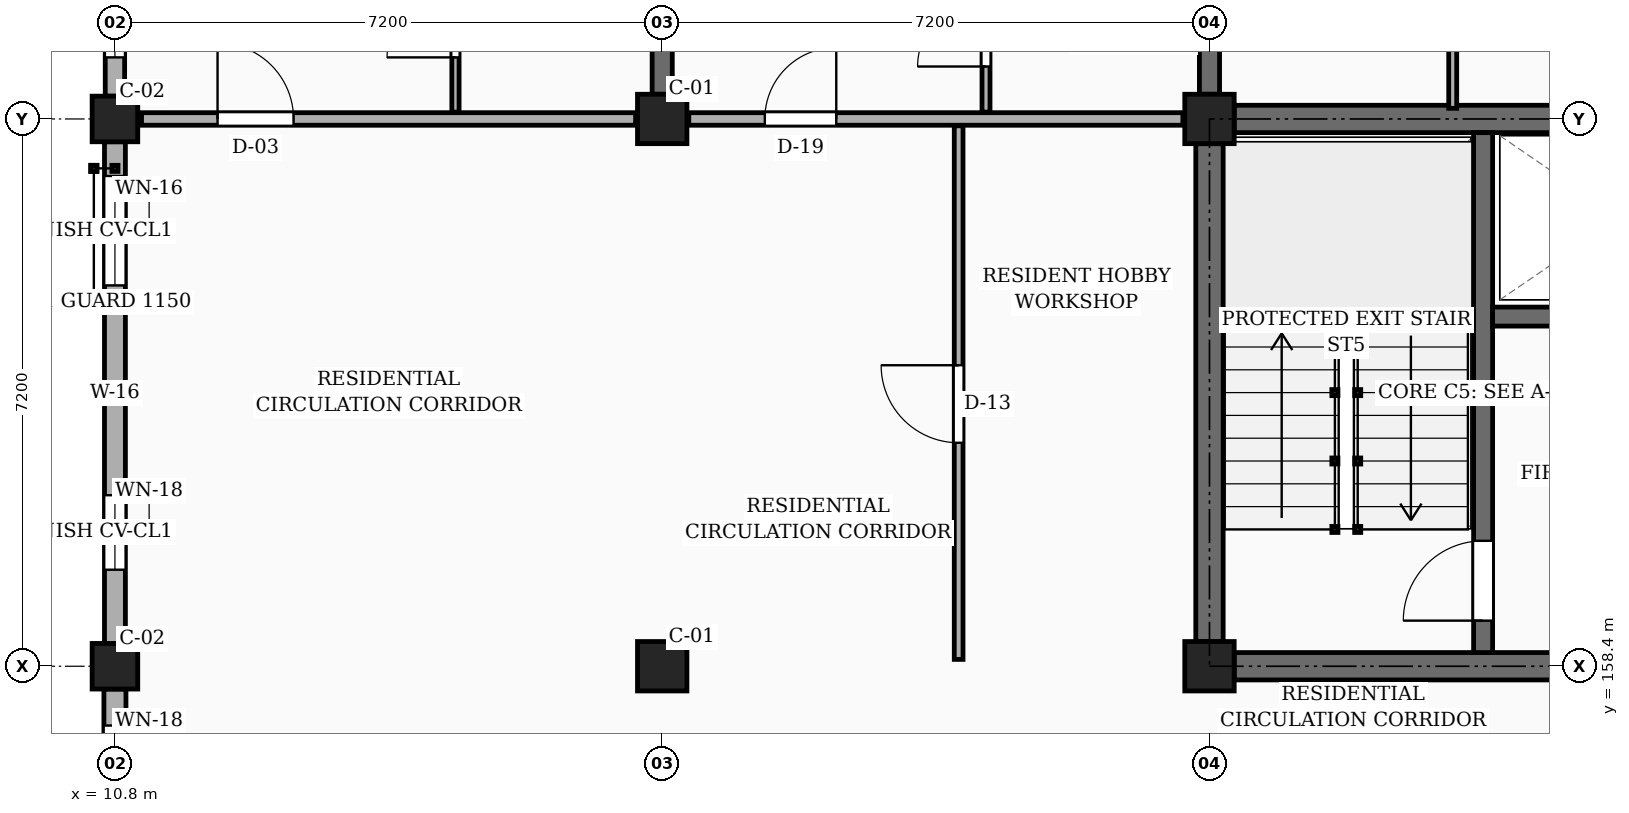
"""IFC4 building model, lengths in metres.
Left out: names, types, materials, properties, quantities, classifications, styles, units other than length and angle.
Written with IfcOpenShell. Run it as: python <this file> out.ifc"""

import sys

from ifc_helpers import new_model, si_unit, direction, frame, frame_2d, origin, origin_2d, place, context, subcontext, project, spatial, rectangle, extrude, element, fill, save


model = new_model("IFC4")
c1 = context("Model", 3, precision=1e-05, world=origin(), true_north=direction((0.0, 1.0)))
c2 = subcontext(c1, "Body", "Model", "MODEL_VIEW")
j1 = project(units=[si_unit("LENGTHUNIT", "METRE"), si_unit("PLANEANGLEUNIT", "RADIAN")], contexts=[c1])
p1 = place(None, origin())
s1 = spatial("IfcSite", under=j1, at=p1, CompositionType="ELEMENT")
p2 = place(p1, origin())
s2 = spatial("IfcBuilding", under=s1, at=p2, CompositionType="ELEMENT")
p3 = place(p2, frame((0.0, 0.0, 7.65)))
s3 = spatial("IfcBuildingStorey", under=s2, at=p3, CompositionType="ELEMENT", Elevation=7.65)
for number, where, z_axis, x_axis in (
    (1, (10.8, 158.4, 0.0), (0.0, 0.0, 1.0), (1.0, 0.0, 0.0)),
    (2, (10.8, 165.6, 0.0), (0.0, 0.0, 1.0), (1.0, 0.0, 0.0)),
):
    element("IfcColumn", number, at=place(p3, frame(where, z_axis=z_axis, x_axis=x_axis)), inside=s3, PredefinedType="COLUMN", context=c2, shape_type="SweptSolid", body=[
        extrude(rectangle(XDim=0.6, YDim=0.6, at=origin_2d()), origin(), (0.0, 0.0, 1.0), 3.15),
    ])
for number, where, z_axis, x_axis in (
    (3, (18.0, 158.4, 0.0), (0.0, 0.0, 1.0), (1.0, 0.0, 0.0)),
    (4, (18.0, 165.6, 0.0), (0.0, 0.0, 1.0), (1.0, 0.0, 0.0)),
    (5, (25.2, 158.4, 0.0), (0.0, 0.0, 1.0), (1.0, 0.0, 0.0)),
    (6, (25.2, 165.6, 0.0), (0.0, 0.0, 1.0), (1.0, 0.0, 0.0)),
):
    element("IfcColumn", number, at=place(p3, frame(where, z_axis=z_axis, x_axis=x_axis)), inside=s3, PredefinedType="COLUMN", context=c2, shape_type="SweptSolid", body=[
        extrude(rectangle(XDim=0.65, YDim=0.65, at=origin_2d()), origin(), (0.0, 0.0, 1.0), 3.15),
    ])
p4 = place(p3, frame((18.0, 165.925, 0.0), z_axis=(0.0, 0.0, 1.0), x_axis=(0.0, 1.0, 0.0)))
e7 = element("IfcWall", 7, at=p4, inside=s3, PredefinedType="SOLIDWALL", context=c2, shape_type="SweptSolid", body=[
    extrude(rectangle(XDim=6.575, YDim=0.265, at=frame_2d((3.288, 0.0))), origin(), (0.0, 0.0, 1.0), 2.185),
])
p5 = place(p3, frame((25.2, 165.925, 0.0), z_axis=(0.0, 0.0, 1.0), x_axis=(0.0, 1.0, 0.0)))
e8 = element("IfcWall", 8, at=p5, inside=s3, PredefinedType="SOLIDWALL", context=c2, shape_type="SweptSolid", body=[
    extrude(rectangle(XDim=6.575, YDim=0.265, at=frame_2d((3.288, 0.0))), origin(), (0.0, 0.0, 1.0), 2.185),
])
p6 = place(p5, frame((4.15, 0.0, 0.0)))
e9 = element("IfcOpeningElement", 9, at=p6, cuts=e8, PredefinedType="OPENING", context=c2, shape_type="SweptSolid", body=[
    extrude(rectangle(XDim=0.98, YDim=2.12, at=frame_2d((0.49, 1.06))), frame((0.0, 0.143, 0.0), z_axis=(0.0, -1.0, 0.0), x_axis=(1.0, 0.0, 0.0)), (0.0, 0.0, 1.0), 0.285),
])
p7 = place(p3, frame((10.8, 172.5, 0.0), z_axis=(0.0, 0.0, 1.0), x_axis=(0.0, -1.0, 0.0)))
e10 = element("IfcWall", 10, at=p7, inside=s3, PredefinedType="SOLIDWALL", context=c2, shape_type="SweptSolid", body=[
    extrude(rectangle(XDim=6.6, YDim=0.255, at=frame_2d((3.3, 0.0))), origin(), (0.0, 0.0, 1.0), 2.455),
])
p8 = place(p7, frame((0.45, 0.0, 0.78)))
e11 = element("IfcOpeningElement", 11, at=p8, cuts=e10, PredefinedType="OPENING", context=c2, shape_type="SweptSolid", body=[
    extrude(rectangle(XDim=1.28, YDim=1.26, at=frame_2d((0.64, 0.63))), frame((0.0, 0.137, 0.0), z_axis=(0.0, -1.0, 0.0), x_axis=(1.0, 0.0, 0.0)), (0.0, 0.0, 1.0), 0.275),
])
p9 = place(p7, frame((4.65, 0.0, 0.78)))
e12 = element("IfcOpeningElement", 12, at=p9, cuts=e10, PredefinedType="OPENING", context=c2, shape_type="SweptSolid", body=[
    extrude(rectangle(XDim=1.44, YDim=1.26, at=frame_2d((0.72, 0.63))), frame((0.0, 0.137, 0.0), z_axis=(0.0, -1.0, 0.0), x_axis=(1.0, 0.0, 0.0)), (0.0, 0.0, 1.0), 0.275),
])
p10 = place(p3, frame((10.8, 165.3, 0.0), z_axis=(0.0, 0.0, 1.0), x_axis=(0.0, -1.0, 0.0)))
e13 = element("IfcWall", 13, at=p10, inside=s3, PredefinedType="SOLIDWALL", context=c2, shape_type="SweptSolid", body=[
    extrude(rectangle(XDim=6.6, YDim=0.275, at=frame_2d((3.3, 0.0))), origin(), (0.0, 0.0, 1.0), 2.455),
])
p11 = place(p10, frame((0.45, 0.0, 0.78)))
e14 = element("IfcOpeningElement", 14, at=p11, cuts=e13, PredefinedType="OPENING", context=c2, shape_type="SweptSolid", body=[
    extrude(rectangle(XDim=1.44, YDim=1.26, at=frame_2d((0.72, 0.63))), frame((0.0, 0.147, 0.0), z_axis=(0.0, -1.0, 0.0), x_axis=(1.0, 0.0, 0.0)), (0.0, 0.0, 1.0), 0.295),
])
p12 = place(p10, frame((4.65, 0.0, 0.78)))
e15 = element("IfcOpeningElement", 15, at=p12, cuts=e13, PredefinedType="OPENING", context=c2, shape_type="SweptSolid", body=[
    extrude(rectangle(XDim=0.98, YDim=1.36, at=frame_2d((0.49, 0.68))), frame((0.0, 0.147, 0.0), z_axis=(0.0, -1.0, 0.0), x_axis=(1.0, 0.0, 0.0)), (0.0, 0.0, 1.0), 0.295),
])
p13 = place(p3, frame((10.8, 158.1, 0.0), z_axis=(0.0, 0.0, 1.0), x_axis=(0.0, -1.0, 0.0)))
e16 = element("IfcWall", 16, at=p13, inside=s3, PredefinedType="SOLIDWALL", context=c2, shape_type="SweptSolid", body=[
    extrude(rectangle(XDim=6.6, YDim=0.29, at=frame_2d((3.3, 0.0))), origin(), (0.0, 0.0, 1.0), 2.455),
])
p14 = place(p13, frame((0.48, 0.0, 0.78)))
e17 = element("IfcOpeningElement", 17, at=p14, cuts=e16, PredefinedType="OPENING", context=c2, shape_type="SweptSolid", body=[
    extrude(rectangle(XDim=0.98, YDim=1.36, at=frame_2d((0.49, 0.68))), frame((0.0, 0.155, 0.0), z_axis=(0.0, -1.0, 0.0), x_axis=(1.0, 0.0, 0.0)), (0.0, 0.0, 1.0), 0.31),
])
p15 = place(p13, frame((2.705, 0.0, 0.78)))
e18 = element("IfcOpeningElement", 18, at=p15, cuts=e16, PredefinedType="OPENING", context=c2, shape_type="SweptSolid", body=[
    extrude(rectangle(XDim=1.14, YDim=1.36, at=frame_2d((0.57, 0.68))), frame((0.0, 0.155, 0.0), z_axis=(0.0, -1.0, 0.0), x_axis=(1.0, 0.0, 0.0)), (0.0, 0.0, 1.0), 0.31),
])
p16 = place(p13, frame((5.085, 0.0, 0.78)))
e19 = element("IfcOpeningElement", 19, at=p16, cuts=e16, PredefinedType="OPENING", context=c2, shape_type="SweptSolid", body=[
    extrude(rectangle(XDim=1.04, YDim=1.26, at=frame_2d((0.52, 0.63))), frame((0.0, 0.155, 0.0), z_axis=(0.0, -1.0, 0.0), x_axis=(1.0, 0.0, 0.0)), (0.0, 0.0, 1.0), 0.31),
])
p17 = place(p3, frame((25.2, 158.725, 0.0), z_axis=(0.0, 0.0, 1.0), x_axis=(0.0, 1.0, 0.0)))
e20 = element("IfcWall", 20, at=p17, inside=s3, PredefinedType="SHEAR", context=c2, shape_type="SweptSolid", body=[
    extrude(rectangle(XDim=6.55, YDim=0.36, at=frame_2d((3.275, 0.0))), origin(), (0.0, 0.0, 1.0), 2.885),
])
p18 = place(p3, frame((25.525, 165.6, 0.0), z_axis=(0.0, 0.0, 1.0), x_axis=(1.0, 0.0, 0.0)))
e21 = element("IfcWall", 21, at=p18, inside=s3, PredefinedType="SHEAR", context=c2, shape_type="SweptSolid", body=[
    extrude(rectangle(XDim=6.55, YDim=0.36, at=frame_2d((3.275, 0.0))), origin(), (0.0, 0.0, 1.0), 2.885),
])
p19 = place(p3, frame((25.525, 158.4, 0.0), z_axis=(0.0, 0.0, 1.0), x_axis=(1.0, 0.0, 0.0)))
e22 = element("IfcWall", 22, at=p19, inside=s3, PredefinedType="SHEAR", context=c2, shape_type="SweptSolid", body=[
    extrude(rectangle(XDim=6.55, YDim=0.36, at=frame_2d((3.275, 0.0))), origin(), (0.0, 0.0, 1.0), 2.885),
])
p20 = place(p19, frame((4.425, 0.0, 0.0)))
e23 = element("IfcOpeningElement", 23, at=p20, cuts=e22, PredefinedType="OPENING", context=c2, shape_type="SweptSolid", body=[
    extrude(rectangle(XDim=1.1, YDim=2.15, at=frame_2d((0.55, 1.075))), frame((0.0, 0.19, 0.0), z_axis=(0.0, -1.0, 0.0), x_axis=(1.0, 0.0, 0.0)), (0.0, 0.0, 1.0), 0.38),
])
p21 = place(p3, frame((28.8, 158.58, 0.0), z_axis=(0.0, 0.0, 1.0), x_axis=(0.0, 1.0, 0.0)))
e24 = element("IfcWall", 24, at=p21, inside=s3, PredefinedType="SHEAR", context=c2, shape_type="SweptSolid", body=[
    extrude(rectangle(XDim=6.84, YDim=0.25, at=frame_2d((3.42, 0.0))), origin(), (0.0, 0.0, 1.0), 2.885),
])
p22 = place(p21, frame((0.42, 0.0, 0.0)))
e25 = element("IfcOpeningElement", 25, at=p22, cuts=e24, PredefinedType="OPENING", context=c2, shape_type="SweptSolid", body=[
    extrude(rectangle(XDim=1.05, YDim=2.15, at=frame_2d((0.525, 1.075))), frame((0.0, 0.135, 0.0), z_axis=(0.0, -1.0, 0.0), x_axis=(1.0, 0.0, 0.0)), (0.0, 0.0, 1.0), 0.27),
])
p23 = place(p3, frame((28.925, 163.0, 0.0), z_axis=(0.0, 0.0, 1.0), x_axis=(1.0, 0.0, 0.0)))
e26 = element("IfcWall", 26, at=p23, inside=s3, PredefinedType="SHEAR", context=c2, shape_type="SweptSolid", body=[
    extrude(rectangle(XDim=3.295, YDim=0.25, at=frame_2d((1.647, 0.0))), origin(), (0.0, 0.0, 1.0), 2.885),
])
p24 = place(p23, frame((1.1, 0.0, 0.0)))
e27 = element("IfcOpeningElement", 27, at=p24, cuts=e26, PredefinedType="OPENING", context=c2, shape_type="SweptSolid", body=[
    extrude(rectangle(XDim=1.1, YDim=2.2, at=frame_2d((0.55, 1.1))), frame((0.0, 0.135, 0.0), z_axis=(0.0, -1.0, 0.0), x_axis=(1.0, 0.0, 0.0)), (0.0, 0.0, 1.0), 0.27),
])
p25 = place(p3, frame((11.15, 165.6, 0.0), z_axis=(0.0, 0.0, 1.0), x_axis=(1.0, 0.0, 0.0)))
e28 = element("IfcWall", 28, at=p25, inside=s3, PredefinedType="PARTITIONING", context=c2, shape_type="SweptSolid", body=[
    extrude(rectangle(XDim=6.5, YDim=0.165, at=frame_2d((3.25, 0.0))), origin(), (0.0, 0.0, 1.0), 2.185),
])
p26 = place(p25, frame((1.0, 0.0, 0.0)))
e29 = element("IfcOpeningElement", 29, at=p26, cuts=e28, PredefinedType="OPENING", context=c2, shape_type="SweptSolid", body=[
    extrude(rectangle(XDim=1.0, YDim=2.15, at=frame_2d((0.5, 1.075))), frame((0.0, 0.093, 0.0), z_axis=(0.0, -1.0, 0.0), x_axis=(1.0, 0.0, 0.0)), (0.0, 0.0, 1.0), 0.185),
])
p27 = place(p3, frame((18.35, 165.6, 0.0), z_axis=(0.0, 0.0, 1.0), x_axis=(1.0, 0.0, 0.0)))
e30 = element("IfcWall", 30, at=p27, inside=s3, PredefinedType="PARTITIONING", context=c2, shape_type="SweptSolid", body=[
    extrude(rectangle(XDim=6.5, YDim=0.165, at=frame_2d((3.25, 0.0))), origin(), (0.0, 0.0, 1.0), 2.185),
])
p28 = place(p27, frame((1.0, 0.0, 0.0)))
e31 = element("IfcOpeningElement", 31, at=p28, cuts=e30, PredefinedType="OPENING", context=c2, shape_type="SweptSolid", body=[
    extrude(rectangle(XDim=0.94, YDim=2.12, at=frame_2d((0.47, 1.06))), frame((0.0, 0.093, 0.0), z_axis=(0.0, -1.0, 0.0), x_axis=(1.0, 0.0, 0.0)), (0.0, 0.0, 1.0), 0.185),
])
p29 = place(p3, frame((15.28, 165.69, 0.0), z_axis=(0.0, 0.0, 1.0), x_axis=(0.0, 1.0, 0.0)))
e32 = element("IfcWall", 32, at=p29, inside=s3, PredefinedType="PARTITIONING", context=c2, shape_type="SweptSolid", body=[
    extrude(rectangle(XDim=2.34, YDim=0.095, at=frame_2d((1.17, 0.0))), origin(), (0.0, 0.0, 1.0), 2.32),
])
p30 = place(p29, frame((0.72, 0.0, 0.0)))
e33 = element("IfcOpeningElement", 33, at=p30, cuts=e32, PredefinedType="OPENING", context=c2, shape_type="SweptSolid", body=[
    extrude(rectangle(XDim=0.9, YDim=2.05, at=frame_2d((0.45, 1.025))), frame((0.0, 0.058, 0.0), z_axis=(0.0, -1.0, 0.0), x_axis=(1.0, 0.0, 0.0)), (0.0, 0.0, 1.0), 0.115),
])
p31 = place(p3, frame((21.9, 158.49, 0.0), z_axis=(0.0, 0.0, 1.0), x_axis=(0.0, 1.0, 0.0)))
e34 = element("IfcWall", 34, at=p31, inside=s3, PredefinedType="PARTITIONING", context=c2, shape_type="SweptSolid", body=[
    extrude(rectangle(XDim=7.02, YDim=0.115, at=frame_2d((3.51, 0.0))), origin(), (0.0, 0.0, 1.0), 2.32),
])
p32 = place(p31, frame((2.85, 0.0, 0.0)))
e35 = element("IfcOpeningElement", 35, at=p32, cuts=e34, PredefinedType="OPENING", context=c2, shape_type="SweptSolid", body=[
    extrude(rectangle(XDim=1.02, YDim=2.15, at=frame_2d((0.51, 1.075))), frame((0.0, 0.067, 0.0), z_axis=(0.0, -1.0, 0.0), x_axis=(1.0, 0.0, 0.0)), (0.0, 0.0, 1.0), 0.135),
])
p33 = place(p3, frame((22.26, 165.69, 0.0), z_axis=(0.0, 0.0, 1.0), x_axis=(0.0, 1.0, 0.0)))
e36 = element("IfcWall", 36, at=p33, inside=s3, PredefinedType="PARTITIONING", context=c2, shape_type="SweptSolid", body=[
    extrude(rectangle(XDim=2.1, YDim=0.105, at=frame_2d((1.05, 0.0))), origin(), (0.0, 0.0, 1.0), 2.32),
])
p34 = place(p33, frame((0.6, 0.0, 0.0)))
e37 = element("IfcOpeningElement", 37, at=p34, cuts=e36, PredefinedType="OPENING", context=c2, shape_type="SweptSolid", body=[
    extrude(rectangle(XDim=0.9, YDim=2.05, at=frame_2d((0.45, 1.025))), frame((0.0, 0.062, 0.0), z_axis=(0.0, -1.0, 0.0), x_axis=(1.0, 0.0, 0.0)), (0.0, 0.0, 1.0), 0.125),
])
p35 = place(p3, frame((28.4, 165.74, 0.0), z_axis=(0.0, 0.0, 1.0), x_axis=(0.0, 1.0, 0.0)))
e38 = element("IfcWall", 38, at=p35, inside=s3, PredefinedType="PARTITIONING", context=c2, shape_type="SweptSolid", body=[
    extrude(rectangle(XDim=3.39, YDim=0.105, at=frame_2d((1.695, 0.0))), origin(), (0.0, 0.0, 1.0), 2.32),
])
p36 = place(p9, origin())
e39 = element("IfcWindow", 39, at=p36, inside=s3, PartitioningType="SINGLE_PANEL", PredefinedType="WINDOW", context=c2, shape_type="SweptSolid", body=[
    extrude(rectangle(XDim=1.44, YDim=1.26, at=frame_2d((0.72, 0.63))), frame((0.0, 0.03, 0.0), z_axis=(0.0, -1.0, 0.0), x_axis=(1.0, 0.0, 0.0)), (0.0, 0.0, 1.0), 0.06),
])
fill(e12, e39)
p37 = place(p11, origin())
e40 = element("IfcWindow", 40, at=p37, inside=s3, PartitioningType="SINGLE_PANEL", PredefinedType="WINDOW", context=c2, shape_type="SweptSolid", body=[
    extrude(rectangle(XDim=1.44, YDim=1.26, at=frame_2d((0.72, 0.63))), frame((0.0, 0.03, 0.0), z_axis=(0.0, -1.0, 0.0), x_axis=(1.0, 0.0, 0.0)), (0.0, 0.0, 1.0), 0.06),
])
fill(e14, e40)
p38 = place(p12, origin())
e41 = element("IfcWindow", 41, at=p38, inside=s3, PartitioningType="SINGLE_PANEL", PredefinedType="WINDOW", context=c2, shape_type="SweptSolid", body=[
    extrude(rectangle(XDim=0.98, YDim=1.36, at=frame_2d((0.49, 0.68))), frame((0.0, 0.03, 0.0), z_axis=(0.0, -1.0, 0.0), x_axis=(1.0, 0.0, 0.0)), (0.0, 0.0, 1.0), 0.06),
])
fill(e15, e41)
p39 = place(p14, origin())
e42 = element("IfcWindow", 42, at=p39, inside=s3, PartitioningType="SINGLE_PANEL", PredefinedType="WINDOW", context=c2, shape_type="SweptSolid", body=[
    extrude(rectangle(XDim=0.98, YDim=1.36, at=frame_2d((0.49, 0.68))), frame((0.0, 0.03, 0.0), z_axis=(0.0, -1.0, 0.0), x_axis=(1.0, 0.0, 0.0)), (0.0, 0.0, 1.0), 0.06),
])
fill(e17, e42)
p40 = place(p22, origin())
e43 = element("IfcDoor", 43, at=p40, inside=s3, OperationType="SINGLE_SWING_LEFT", PredefinedType="DOOR", context=c2, shape_type="SweptSolid", body=[
    extrude(rectangle(XDim=1.05, YDim=2.15, at=frame_2d((0.525, 1.075))), frame((0.0, 0.025, 0.0), z_axis=(0.0, -1.0, 0.0), x_axis=(1.0, 0.0, 0.0)), (0.0, 0.0, 1.0), 0.05),
])
fill(e25, e43)
p41 = place(p26, origin())
e44 = element("IfcDoor", 44, at=p41, inside=s3, OperationType="SINGLE_SWING_LEFT", PredefinedType="DOOR", context=c2, shape_type="SweptSolid", body=[
    extrude(rectangle(XDim=1.0, YDim=2.15, at=frame_2d((0.5, 1.075))), frame((0.0, 0.025, 0.0), z_axis=(0.0, -1.0, 0.0), x_axis=(1.0, 0.0, 0.0)), (0.0, 0.0, 1.0), 0.05),
])
fill(e29, e44)
p42 = place(p28, origin())
e45 = element("IfcDoor", 45, at=p42, inside=s3, OperationType="SINGLE_SWING_RIGHT", PredefinedType="DOOR", context=c2, shape_type="SweptSolid", body=[
    extrude(rectangle(XDim=0.94, YDim=2.12, at=frame_2d((0.47, 1.06))), frame((0.0, 0.025, 0.0), z_axis=(0.0, -1.0, 0.0), x_axis=(1.0, 0.0, 0.0)), (0.0, 0.0, 1.0), 0.05),
])
fill(e31, e45)
p43 = place(p30, origin())
e46 = element("IfcDoor", 46, at=p43, inside=s3, OperationType="SINGLE_SWING_LEFT", PredefinedType="DOOR", context=c2, shape_type="SweptSolid", body=[
    extrude(rectangle(XDim=0.9, YDim=2.05, at=frame_2d((0.45, 1.025))), frame((0.0, 0.025, 0.0), z_axis=(0.0, -1.0, 0.0), x_axis=(1.0, 0.0, 0.0)), (0.0, 0.0, 1.0), 0.05),
])
fill(e33, e46)
p44 = place(p32, origin())
e47 = element("IfcDoor", 47, at=p44, inside=s3, OperationType="SINGLE_SWING_RIGHT", PredefinedType="DOOR", context=c2, shape_type="SweptSolid", body=[
    extrude(rectangle(XDim=1.02, YDim=2.15, at=frame_2d((0.51, 1.075))), frame((0.0, 0.025, 0.0), z_axis=(0.0, -1.0, 0.0), x_axis=(1.0, 0.0, 0.0)), (0.0, 0.0, 1.0), 0.05),
])
fill(e35, e47)
p45 = place(p34, origin())
e48 = element("IfcDoor", 48, at=p45, inside=s3, OperationType="SINGLE_SWING_LEFT", PredefinedType="DOOR", context=c2, shape_type="SweptSolid", body=[
    extrude(rectangle(XDim=0.9, YDim=2.05, at=frame_2d((0.45, 1.025))), frame((0.0, 0.025, 0.0), z_axis=(0.0, -1.0, 0.0), x_axis=(1.0, 0.0, 0.0)), (0.0, 0.0, 1.0), 0.05),
])
fill(e37, e48)
save(model, sys.argv[1])
